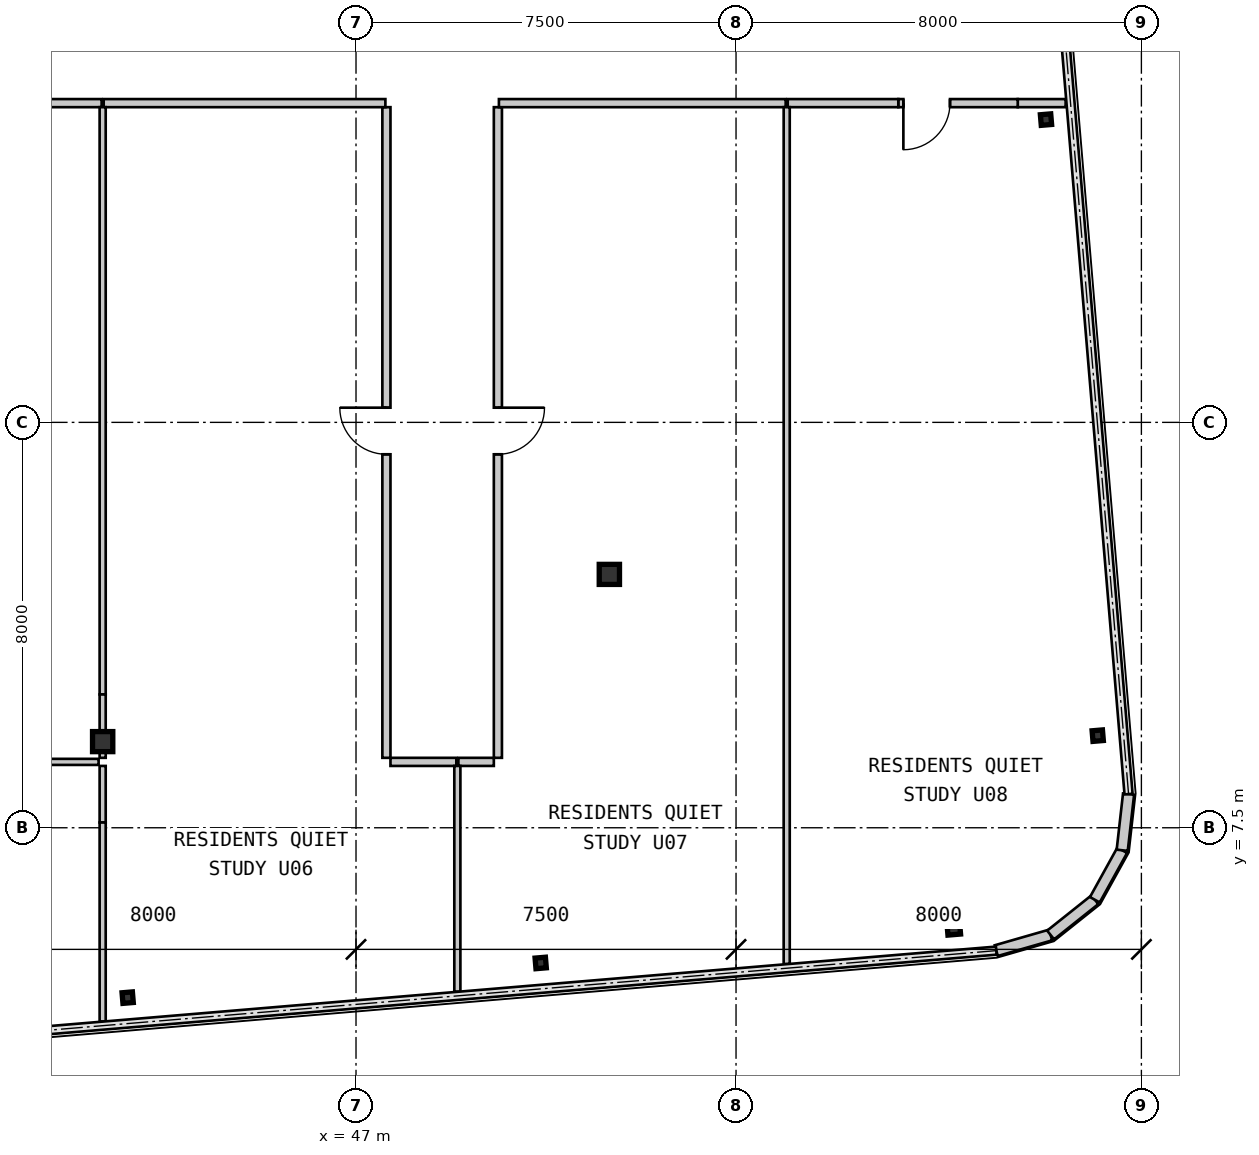
"""IFC4 building model, lengths in metres.
Left out: names, types, materials, properties, quantities, classifications, styles, units other than length and angle.
Written with IfcOpenShell. Run it as: python <this file> out.ifc"""

import sys

from ifc_helpers import new_model, si_unit, direction, frame, frame_2d, origin, origin_2d, place, context, subcontext, project, spatial, rectangle, hollow_rectangle, i_section, extrude, source, transform, mapped, element, fill, save


model = new_model("IFC4")
c1 = context("Model", 3, precision=1e-05, world=origin(), true_north=direction((0.0, 1.0)))
c2 = subcontext(c1, "Body", "Model", "MODEL_VIEW")
j1 = project(units=[si_unit("LENGTHUNIT", "METRE"), si_unit("PLANEANGLEUNIT", "RADIAN")], contexts=[c1])
p1 = place(None, origin())
s1 = spatial("IfcSite", under=j1, at=p1, CompositionType="ELEMENT")
p2 = place(p1, origin())
s2 = spatial("IfcBuilding", under=s1, at=p2, CompositionType="ELEMENT")
p3 = place(p2, frame((0.0, 0.0, 172.55)))
s3 = spatial("IfcBuildingStorey", under=s2, at=p3, CompositionType="ELEMENT", Elevation=172.55)
m1 = source(origin(), c2, "Body", "SweptSolid", [
    extrude(i_section(OverallWidth=0.4, OverallDepth=0.396, WebThickness=0.022, FlangeThickness=0.034, at=origin_2d()), origin(), (0.0, 0.0, 1.0), 3.15),
])
for number, where, z_axis, x_axis in (
    (1, (42.0, 9.2, 0.0), (0.0, 0.0, 1.0), (1.0, 0.0, 0.0)),
    (2, (52.0, 12.5, 0.0), (0.0, 0.0, 1.0), (1.0, 0.0, 0.0)),
):
    element("IfcColumn", number, at=place(p3, frame(where, z_axis=z_axis, x_axis=x_axis)), inside=s3, PredefinedType="COLUMN", context=c2, shape_type="MappedRepresentation", body=[
        mapped(m1, transform((0.0, 0.0, 0.0), scale=1.0)),
    ])
m2 = source(origin(), c2, "Body", "SweptSolid", [
    extrude(i_section(OverallWidth=0.205, OverallDepth=0.21, WebThickness=0.009, FlangeThickness=0.014, at=origin_2d()), origin(), (0.0, 0.0, 1.0), 3.15),
])
for number, where, z_axis, x_axis in (
    (3, (42.494, 4.147, 0.0), (0.0, 0.0, 1.0), (0.996, 0.084, 0.0)),
    (4, (50.645, 4.832, 0.0), (0.0, 0.0, 1.0), (0.996, 0.084, 0.0)),
):
    element("IfcColumn", number, at=place(p3, frame(where, z_axis=z_axis, x_axis=x_axis)), inside=s3, PredefinedType="COLUMN", context=c2, shape_type="MappedRepresentation", body=[
        mapped(m2, transform((0.0, 0.0, 0.0), scale=1.0)),
    ])
m3 = source(origin(), c2, "Body", "SweptSolid", [
    extrude(hollow_rectangle(XDim=0.25, YDim=0.25, WallThickness=0.01, at=origin_2d()), origin(), (0.0, 0.0, 1.0), 3.15),
])
p4 = place(p3, frame((58.796, 5.516, 0.0), z_axis=(0.0, 0.0, 1.0), x_axis=(0.99649285925, 0.083677843332, 0.0)))
e5 = element("IfcColumn", 5, at=p4, inside=s3, PredefinedType="COLUMN", context=c2, shape_type="MappedRepresentation", body=[
    mapped(m3, transform((0.0, 0.0, 0.0), scale=1.0)),
])
for number, where, z_axis, x_axis in (
    (6, (61.638, 9.318, 0.0), (0.0, 0.0, 1.0), (0.996, 0.084, 0.0)),
    (7, (60.617, 21.475, 0.0), (0.0, 0.0, 1.0), (0.996, 0.084, 0.0)),
):
    element("IfcColumn", number, at=place(p3, frame(where, z_axis=z_axis, x_axis=x_axis)), inside=s3, PredefinedType="COLUMN", context=c2, shape_type="MappedRepresentation", body=[
        mapped(m2, transform((0.0, 0.0, 0.0), scale=1.0)),
    ])
m4 = source(origin(), c2, "Body", "SweptSolid", [
    extrude(rectangle(XDim=1.116, YDim=0.22, at=frame_2d((0.558, 0.0))), origin(), (0.0, 0.0, 1.0), 2.93),
])
for number, where, z_axis, x_axis in (
    (8, (59.636, 5.075, 0.0), (0.0, 0.0, 1.0), (0.961, 0.277, 0.0)),
    (9, (60.708, 5.384, 0.0), (0.0, 0.0, 1.0), (0.782, 0.623, 0.0)),
    (10, (61.581, 6.079, 0.0), (0.0, 0.0, 1.0), (0.484, 0.875, 0.0)),
    (11, (62.121, 7.056, 0.0), (0.0, 0.0, 1.0), (0.112, 0.994, 0.0)),
):
    element("IfcWall", number, at=place(p3, frame(where, z_axis=z_axis, x_axis=x_axis)), inside=s3, PredefinedType="SOLIDWALL", context=c2, shape_type="MappedRepresentation", body=[
        mapped(m4, transform((0.0, 0.0, 0.0), scale=1.0)),
    ])
m5 = source(origin(), c2, "Body", "SweptSolid", [
    extrude(rectangle(XDim=6.959, YDim=0.16, at=frame_2d((3.48, 0.0))), origin(), (0.0, 0.0, 1.0), 2.93),
])
p5 = place(p3, frame((41.98, 21.8, 0.0), z_axis=(0.0, 0.0, 1.0), x_axis=(-1.0, 0.0, 0.0)))
e12 = element("IfcWall", 12, at=p5, inside=s3, PredefinedType="PARTITIONING", context=c2, shape_type="MappedRepresentation", body=[
    mapped(m5, transform((0.0, 0.0, 0.0), scale=1.0)),
])
m6 = source(origin(), c2, "Body", "SweptSolid", [
    extrude(rectangle(XDim=0.92, YDim=2.1, at=frame_2d((0.46, 1.05))), frame((0.0, 0.09, 0.0), z_axis=(0.0, -1.0, 0.0), x_axis=(1.0, 0.0, 0.0)), (0.0, 0.0, 1.0), 0.18),
])
p6 = place(p5, frame((3.02, 0.0, 0.0)))
e13 = element("IfcOpeningElement", 13, at=p6, cuts=e12, PredefinedType="OPENING", context=c2, shape_type="MappedRepresentation", body=[
    mapped(m6, transform((0.0, 0.0, 0.0), scale=1.0)),
])
m7 = source(origin(), c2, "Body", "SweptSolid", [
    extrude(rectangle(XDim=12.84, YDim=0.16, at=frame_2d((6.42, 0.0))), origin(), (0.0, 0.0, 1.0), 2.93),
])
p7 = place(p3, frame((47.6, 8.88, 0.0), z_axis=(0.0, 0.0, 1.0), x_axis=(0.0, 1.0, 0.0)))
e14 = element("IfcWall", 14, at=p7, inside=s3, PredefinedType="PARTITIONING", context=c2, shape_type="MappedRepresentation", body=[
    mapped(m7, transform((0.0, 0.0, 0.0), scale=1.0)),
])
p8 = place(p7, frame((5.99, 0.0, 0.0)))
e15 = element("IfcOpeningElement", 15, at=p8, cuts=e14, PredefinedType="OPENING", context=c2, shape_type="MappedRepresentation", body=[
    mapped(m6, transform((0.0, 0.0, 0.0), scale=1.0)),
])
m8 = source(origin(), c2, "Body", "SweptSolid", [
    extrude(rectangle(XDim=5.56, YDim=0.16, at=frame_2d((2.78, 0.0))), origin(), (0.0, 0.0, 1.0), 2.93),
])
p9 = place(p3, frame((47.58, 21.8, 0.0), z_axis=(0.0, 0.0, 1.0), x_axis=(-1.0, 0.0, 0.0)))
e16 = element("IfcWall", 16, at=p9, inside=s3, PredefinedType="PARTITIONING", context=c2, shape_type="MappedRepresentation", body=[
    mapped(m8, transform((0.0, 0.0, 0.0), scale=1.0)),
])
m9 = source(origin(), c2, "Body", "SweptSolid", [
    extrude(rectangle(XDim=1.3, YDim=0.16, at=frame_2d((0.65, 0.0))), origin(), (0.0, 0.0, 1.0), 2.93),
])
p10 = place(p3, frame((48.98, 8.8, 0.0), z_axis=(0.0, 0.0, 1.0), x_axis=(-1.0, 0.0, 0.0)))
e17 = element("IfcWall", 17, at=p10, inside=s3, PredefinedType="PARTITIONING", context=c2, shape_type="MappedRepresentation", body=[
    mapped(m9, transform((0.0, 0.0, 0.0), scale=1.0)),
])
p11 = place(p3, frame((49.8, 21.72, 0.0), z_axis=(0.0, 0.0, 1.0), x_axis=(0.0, -1.0, 0.0)))
e18 = element("IfcWall", 18, at=p11, inside=s3, PredefinedType="PARTITIONING", context=c2, shape_type="MappedRepresentation", body=[
    mapped(m7, transform((0.0, 0.0, 0.0), scale=1.0)),
])
p12 = place(p11, frame((5.93, 0.0, 0.0)))
e19 = element("IfcOpeningElement", 19, at=p12, cuts=e18, PredefinedType="OPENING", context=c2, shape_type="MappedRepresentation", body=[
    mapped(m6, transform((0.0, 0.0, 0.0), scale=1.0)),
])
m10 = source(origin(), c2, "Body", "SweptSolid", [
    extrude(rectangle(XDim=5.659, YDim=0.16, at=frame_2d((2.83, 0.0))), origin(), (0.0, 0.0, 1.0), 2.93),
])
p13 = place(p3, frame((55.48, 21.8, 0.0), z_axis=(0.0, 0.0, 1.0), x_axis=(-1.0, 0.0, 0.0)))
e20 = element("IfcWall", 20, at=p13, inside=s3, PredefinedType="PARTITIONING", context=c2, shape_type="MappedRepresentation", body=[
    mapped(m10, transform((0.0, 0.0, 0.0), scale=1.0)),
])
m11 = source(origin(), c2, "Body", "SweptSolid", [
    extrude(rectangle(XDim=0.7, YDim=0.16, at=frame_2d((0.35, 0.0))), origin(), (0.0, 0.0, 1.0), 2.93),
])
p14 = place(p3, frame((49.72, 8.8, 0.0), z_axis=(0.0, 0.0, 1.0), x_axis=(-1.0, 0.0, 0.0)))
e21 = element("IfcWall", 21, at=p14, inside=s3, PredefinedType="PARTITIONING", context=c2, shape_type="MappedRepresentation", body=[
    mapped(m11, transform((0.0, 0.0, 0.0), scale=1.0)),
])
m12 = source(origin(), c2, "Body", "SweptSolid", [
    extrude(rectangle(XDim=0.945, YDim=0.16, at=frame_2d((0.473, 0.0))), origin(), (0.0, 0.0, 1.0), 2.93),
])
p15 = place(p3, frame((61.005, 21.8, 0.0), z_axis=(0.0, 0.0, 1.0), x_axis=(-1.0, 0.0, 0.0)))
e22 = element("IfcWall", 22, at=p15, inside=s3, PredefinedType="PARTITIONING", context=c2, shape_type="MappedRepresentation", body=[
    mapped(m12, transform((0.0, 0.0, 0.0), scale=1.0)),
])
m13 = source(origin(), c2, "Body", "SweptSolid", [
    extrude(rectangle(XDim=2.357, YDim=0.16, at=frame_2d((1.178, 0.0))), origin(), (0.0, 0.0, 1.0), 2.47),
])
p16 = place(p3, frame((60.059, 21.8, 0.0), z_axis=(0.0, 0.0, 1.0), x_axis=(-1.0, 0.0, 0.0)))
e23 = element("IfcWall", 23, at=p16, inside=s3, PredefinedType="PARTITIONING", context=c2, shape_type="MappedRepresentation", body=[
    mapped(m13, transform((0.0, 0.0, 0.0), scale=1.0)),
])
p17 = place(p16, frame((1.337, 0.0, 0.0)))
e24 = element("IfcOpeningElement", 24, at=p17, cuts=e23, PredefinedType="OPENING", context=c2, shape_type="MappedRepresentation", body=[
    mapped(m6, transform((0.0, 0.0, 0.0), scale=1.0)),
])
m14 = source(origin(), c2, "Body", "SweptSolid", [
    extrude(rectangle(XDim=2.182, YDim=0.16, at=frame_2d((1.091, 0.0))), origin(), (0.0, 0.0, 1.0), 2.93),
])
p18 = place(p3, frame((57.702, 21.8, 0.0), z_axis=(0.0, 0.0, 1.0), x_axis=(-1.0, 0.0, 0.0)))
e25 = element("IfcWall", 25, at=p18, inside=s3, PredefinedType="PARTITIONING", context=c2, shape_type="MappedRepresentation", body=[
    mapped(m14, transform((0.0, 0.0, 0.0), scale=1.0)),
])
m15 = source(origin(), c2, "Body", "SweptSolid", [
    extrude(rectangle(XDim=6.9, YDim=0.12, at=frame_2d((3.45, 0.0))), origin(), (0.0, 0.0, 1.0), 2.93),
])
p19 = place(p3, frame((35.02, 8.8, 0.0), z_axis=(0.0, 0.0, 1.0), x_axis=(1.0, 0.0, 0.0)))
e26 = element("IfcWall", 26, at=p19, inside=s3, PredefinedType="PARTITIONING", context=c2, shape_type="MappedRepresentation", body=[
    mapped(m15, transform((0.0, 0.0, 0.0), scale=1.0)),
])
m16 = source(origin(), c2, "Body", "SweptSolid", [
    extrude(rectangle(XDim=1.116, YDim=0.12, at=frame_2d((0.558, 0.0))), origin(), (0.0, 0.0, 1.0), 2.47),
])
p20 = place(p3, frame((42.0, 8.72, 0.0), z_axis=(0.0, 0.0, 1.0), x_axis=(0.0, -1.0, 0.0)))
e27 = element("IfcWall", 27, at=p20, inside=s3, PredefinedType="PARTITIONING", context=c2, shape_type="MappedRepresentation", body=[
    mapped(m16, transform((0.0, 0.0, 0.0), scale=1.0)),
])
m17 = source(origin(), c2, "Body", "SweptSolid", [
    extrude(rectangle(XDim=3.926, YDim=0.12, at=frame_2d((1.963, 0.0))), origin(), (0.0, 0.0, 1.0), 2.93),
])
p21 = place(p3, frame((42.0, 7.604, 0.0), z_axis=(0.0, 0.0, 1.0), x_axis=(0.0, -1.0, 0.0)))
e28 = element("IfcWall", 28, at=p21, inside=s3, PredefinedType="PARTITIONING", context=c2, shape_type="MappedRepresentation", body=[
    mapped(m17, transform((0.0, 0.0, 0.0), scale=1.0)),
])
m18 = source(origin(), c2, "Body", "SweptSolid", [
    extrude(rectangle(XDim=11.59, YDim=0.12, at=frame_2d((5.795, 0.0))), origin(), (0.0, 0.0, 1.0), 2.93),
])
p22 = place(p3, frame((42.0, 21.72, 0.0), z_axis=(0.0, 0.0, 1.0), x_axis=(0.0, -1.0, 0.0)))
e29 = element("IfcWall", 29, at=p22, inside=s3, PredefinedType="PARTITIONING", context=c2, shape_type="MappedRepresentation", body=[
    mapped(m18, transform((0.0, 0.0, 0.0), scale=1.0)),
])
m19 = source(origin(), c2, "Body", "SweptSolid", [
    extrude(rectangle(XDim=0.942, YDim=0.12, at=frame_2d((0.471, 0.0))), origin(), (0.0, 0.0, 1.0), 2.328),
])
p23 = place(p3, frame((42.0, 10.13, 0.0), z_axis=(0.0, 0.0, 1.0), x_axis=(0.0, -1.0, 0.0)))
e30 = element("IfcWall", 30, at=p23, inside=s3, PredefinedType="PARTITIONING", context=c2, shape_type="MappedRepresentation", body=[
    mapped(m19, transform((0.0, 0.0, 0.0), scale=1.0)),
])
m20 = source(origin(), c2, "Body", "SweptSolid", [
    extrude(rectangle(XDim=0.309, YDim=0.12, at=frame_2d((0.154, 0.0))), origin(), (0.0, 0.0, 1.0), 2.93),
])
p24 = place(p3, frame((42.0, 9.189, 0.0), z_axis=(0.0, 0.0, 1.0), x_axis=(0.0, -1.0, 0.0)))
e31 = element("IfcWall", 31, at=p24, inside=s3, PredefinedType="PARTITIONING", context=c2, shape_type="MappedRepresentation", body=[
    mapped(m20, transform((0.0, 0.0, 0.0), scale=1.0)),
])
m21 = source(origin(), c2, "Body", "SweptSolid", [
    extrude(rectangle(XDim=4.454, YDim=0.12, at=frame_2d((2.227, 0.0))), origin(), (0.0, 0.0, 1.0), 2.93),
])
p25 = place(p3, frame((49.0, 8.72, 0.0), z_axis=(0.0, 0.0, 1.0), x_axis=(0.0, -1.0, 0.0)))
e32 = element("IfcWall", 32, at=p25, inside=s3, PredefinedType="PARTITIONING", context=c2, shape_type="MappedRepresentation", body=[
    mapped(m21, transform((0.0, 0.0, 0.0), scale=1.0)),
])
m22 = source(origin(), c2, "Body", "SweptSolid", [
    extrude(rectangle(XDim=16.908, YDim=0.12, at=frame_2d((8.454, 0.0))), origin(), (0.0, 0.0, 1.0), 2.93),
])
p26 = place(p3, frame((55.5, 21.72, 0.0), z_axis=(0.0, 0.0, 1.0), x_axis=(0.0, -1.0, 0.0)))
e33 = element("IfcWall", 33, at=p26, inside=s3, PredefinedType="PARTITIONING", context=c2, shape_type="MappedRepresentation", body=[
    mapped(m22, transform((0.0, 0.0, 0.0), scale=1.0)),
])
m23 = source(origin(), c2, "Body", "SweptSolid", [
    extrude(rectangle(XDim=0.92, YDim=2.1, at=frame_2d((0.46, 1.05))), frame((0.0, 0.025, 0.0), z_axis=(0.0, -1.0, 0.0), x_axis=(1.0, 0.0, 0.0)), (0.0, 0.0, 1.0), 0.05),
])
p27 = place(p8, origin())
e34 = element("IfcDoor", 34, at=p27, inside=s3, OperationType="SINGLE_SWING_RIGHT", PredefinedType="DOOR", context=c2, shape_type="MappedRepresentation", body=[
    mapped(m23, transform((0.0, 0.0, 0.0), scale=1.0)),
])
fill(e15, e34)
p28 = place(p12, origin())
e35 = element("IfcDoor", 35, at=p28, inside=s3, OperationType="SINGLE_SWING_LEFT", PredefinedType="DOOR", context=c2, shape_type="MappedRepresentation", body=[
    mapped(m23, transform((0.0, 0.0, 0.0), scale=1.0)),
])
fill(e19, e35)
p29 = place(p17, origin())
e36 = element("IfcDoor", 36, at=p29, inside=s3, OperationType="SINGLE_SWING_RIGHT", PredefinedType="DOOR", context=c2, shape_type="MappedRepresentation", body=[
    mapped(m23, transform((0.0, 0.0, 0.0), scale=1.0)),
])
fill(e24, e36)
save(model, sys.argv[1])
